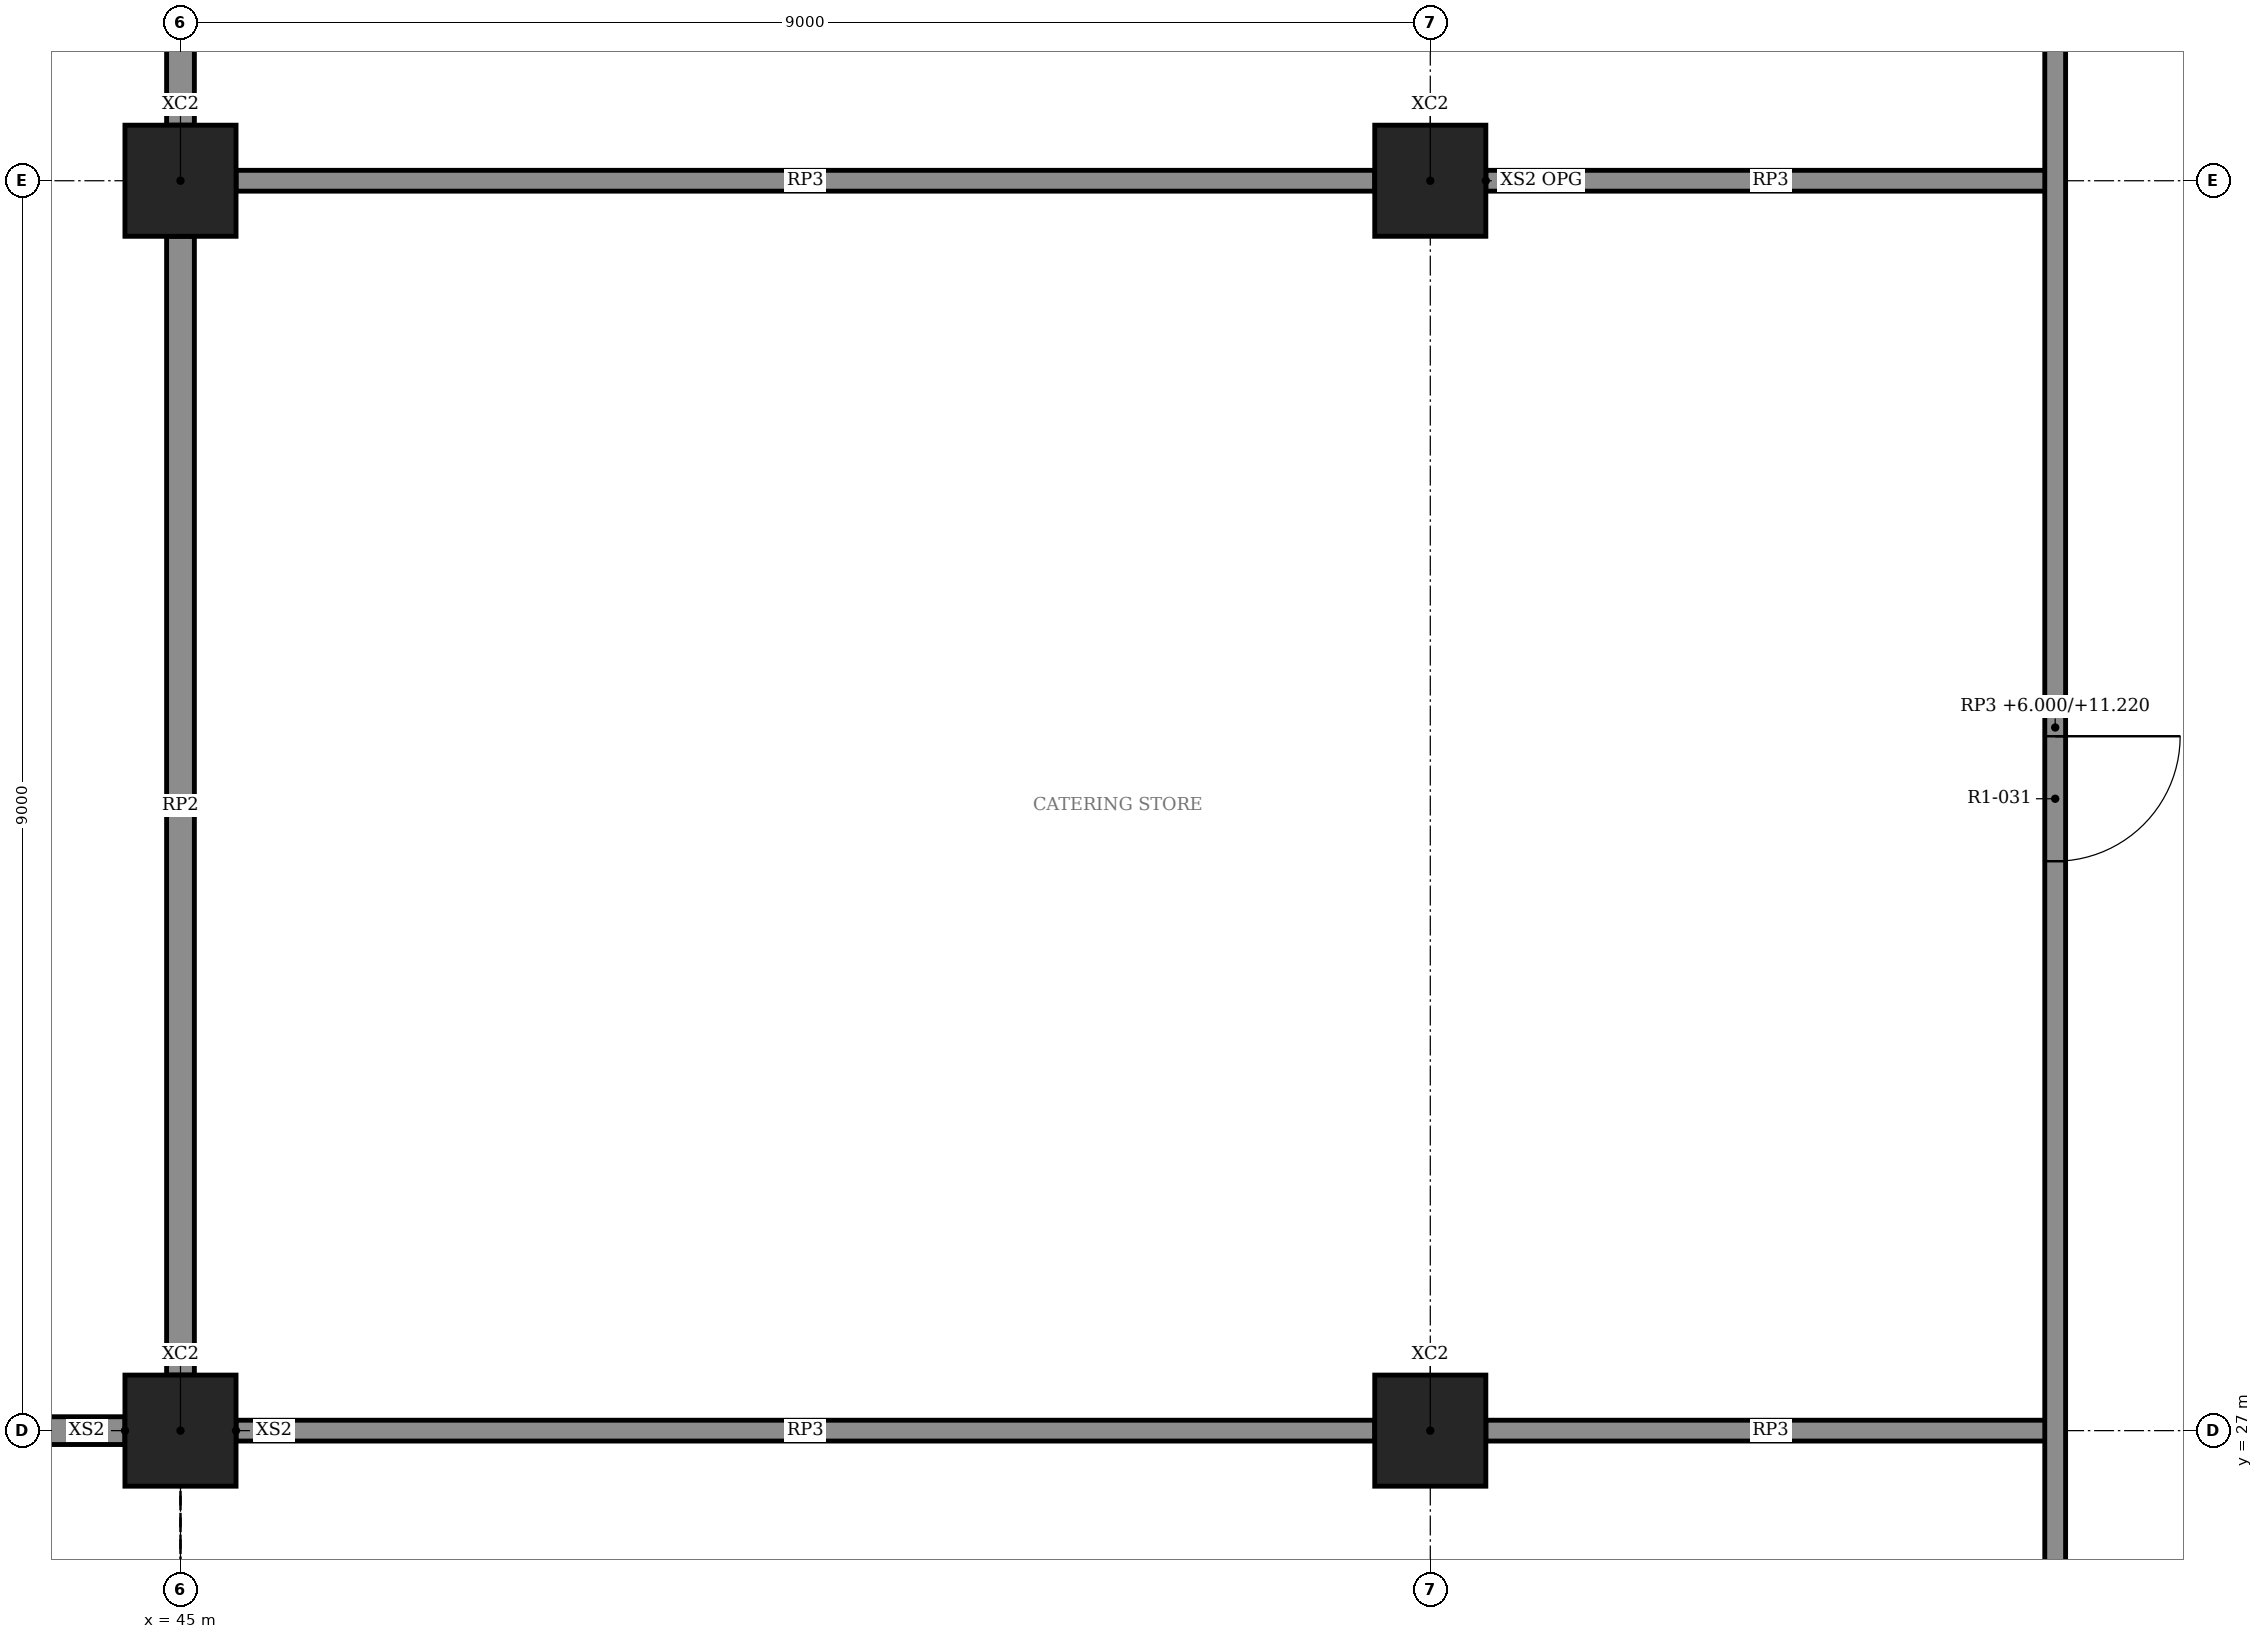
"""IFC4 building model, lengths in metres.
Left out: names, types, materials, properties, quantities, classifications, styles, units other than length and angle.
Written with IfcOpenShell. Run it as: python <this file> out.ifc"""

import sys

from ifc_helpers import new_model, si_unit, direction, frame, frame_2d, origin, origin_2d, place, context, subcontext, project, spatial, rectangle, extrude, element, fill, save


model = new_model("IFC4")
c1 = context("Model", 3, precision=1e-05, world=origin(), true_north=direction((0.0, 1.0)))
c2 = subcontext(c1, "Body", "Model", "MODEL_VIEW")
j1 = project(units=[si_unit("LENGTHUNIT", "METRE"), si_unit("PLANEANGLEUNIT", "RADIAN")], contexts=[c1])
p1 = place(None, origin())
s1 = spatial("IfcSite", under=j1, at=p1, CompositionType="ELEMENT")
p2 = place(p1, origin())
s2 = spatial("IfcBuilding", under=s1, at=p2, CompositionType="ELEMENT")
p3 = place(p2, frame((0.0, 0.0, 6.0)))
s3 = spatial("IfcBuildingStorey", under=s2, at=p3, CompositionType="ELEMENT", Elevation=6.0)
for number, where, z_axis, x_axis in (
    (1, (45.0, 27.0, 0.0), (0.0, 0.0, 1.0), (1.0, 0.0, 0.0)),
    (2, (45.0, 36.0, 0.0), (0.0, 0.0, 1.0), (1.0, 0.0, 0.0)),
    (3, (54.0, 27.0, 0.0), (0.0, 0.0, 1.0), (1.0, 0.0, 0.0)),
    (4, (54.0, 36.0, 0.0), (0.0, 0.0, 1.0), (1.0, 0.0, 0.0)),
):
    element("IfcColumn", number, at=place(p3, frame(where, z_axis=z_axis, x_axis=x_axis)), inside=s3, PredefinedType="COLUMN", context=c2, shape_type="SweptSolid", body=[
        extrude(rectangle(XDim=0.8, YDim=0.8, at=origin_2d()), origin(), (0.0, 0.0, 1.0), 5.5),
    ])
p4 = place(p3, frame((36.4, 27.0, 0.0), z_axis=(0.0, 0.0, 1.0), x_axis=(1.0, 0.0, 0.0)))
e5 = element("IfcWall", 5, at=p4, inside=s3, PredefinedType="PARTITIONING", context=c2, shape_type="SweptSolid", body=[
    extrude(rectangle(XDim=8.2, YDim=0.2, at=frame_2d((4.1, 0.0))), origin(), (0.0, 0.0, 1.0), 4.32),
])
p5 = place(p4, frame((0.95, 0.0, 0.0)))
e6 = element("IfcOpeningElement", 6, at=p5, cuts=e5, PredefinedType="OPENING", context=c2, shape_type="SweptSolid", body=[
    extrude(rectangle(XDim=1.8, YDim=2.4, at=frame_2d((0.9, 1.2))), frame((0.0, 0.11, 0.0), z_axis=(0.0, -1.0, 0.0), x_axis=(1.0, 0.0, 0.0)), (0.0, 0.0, 1.0), 0.22),
])
p6 = place(p3, frame((45.4, 27.0, 0.0), z_axis=(0.0, 0.0, 1.0), x_axis=(1.0, 0.0, 0.0)))
e7 = element("IfcWall", 7, at=p6, inside=s3, PredefinedType="PARTITIONING", context=c2, shape_type="SweptSolid", body=[
    extrude(rectangle(XDim=8.2, YDim=0.15, at=frame_2d((4.1, 0.0))), origin(), (0.0, 0.0, 1.0), 4.32),
])
p7 = place(p3, frame((54.4, 27.0, 0.0), z_axis=(0.0, 0.0, 1.0), x_axis=(1.0, 0.0, 0.0)))
e8 = element("IfcWall", 8, at=p7, inside=s3, PredefinedType="PARTITIONING", context=c2, shape_type="SweptSolid", body=[
    extrude(rectangle(XDim=4.1, YDim=0.15, at=frame_2d((2.05, 0.0))), origin(), (0.0, 0.0, 1.0), 4.32),
])
p8 = place(p3, frame((45.4, 36.0, 0.0), z_axis=(0.0, 0.0, 1.0), x_axis=(1.0, 0.0, 0.0)))
e9 = element("IfcWall", 9, at=p8, inside=s3, PredefinedType="PARTITIONING", context=c2, shape_type="SweptSolid", body=[
    extrude(rectangle(XDim=8.2, YDim=0.15, at=frame_2d((4.1, 0.0))), origin(), (0.0, 0.0, 1.0), 4.32),
])
p9 = place(p3, frame((54.4, 36.0, 0.0), z_axis=(0.0, 0.0, 1.0), x_axis=(1.0, 0.0, 0.0)))
e10 = element("IfcWall", 10, at=p9, inside=s3, PredefinedType="PARTITIONING", context=c2, shape_type="SweptSolid", body=[
    extrude(rectangle(XDim=4.1, YDim=0.15, at=frame_2d((2.05, 0.0))), origin(), (0.0, 0.0, 1.0), 4.32),
])
for number, where, z_axis, x_axis in (
    (11, (45.0, 27.4, 0.0), (0.0, 0.0, 1.0), (0.0, 1.0, 0.0)),
    (12, (45.0, 36.4, 0.0), (0.0, 0.0, 1.0), (0.0, 1.0, 0.0)),
):
    element("IfcWall", number, at=place(p3, frame(where, z_axis=z_axis, x_axis=x_axis)), inside=s3, PredefinedType="PARTITIONING", context=c2, shape_type="SweptSolid", body=[
        extrude(rectangle(XDim=8.2, YDim=0.2, at=frame_2d((4.1, 0.0))), origin(), (0.0, 0.0, 1.0), 4.32),
    ])
p10 = place(p3, frame((58.5, 9.0, 0.0), z_axis=(0.0, 0.0, 1.0), x_axis=(0.0, 1.0, 0.0)))
e13 = element("IfcWall", 13, at=p10, inside=s3, PredefinedType="PARTITIONING", context=c2, shape_type="SweptSolid", body=[
    extrude(rectangle(XDim=36.0, YDim=0.15, at=frame_2d((18.0, 0.0))), origin(), (0.0, 0.0, 1.0), 5.22),
])
p11 = place(p10, frame((8.1, 0.0, 0.0)))
e14 = element("IfcOpeningElement", 14, at=p11, cuts=e13, PredefinedType="OPENING", context=c2, shape_type="SweptSolid", body=[
    extrude(rectangle(XDim=1.8, YDim=2.4, at=frame_2d((0.9, 1.2))), frame((0.0, 0.085, 0.0), z_axis=(0.0, -1.0, 0.0), x_axis=(1.0, 0.0, 0.0)), (0.0, 0.0, 1.0), 0.17),
])
p12 = place(p10, frame((22.1, 0.0, 0.0)))
e15 = element("IfcOpeningElement", 15, at=p12, cuts=e13, PredefinedType="OPENING", context=c2, shape_type="SweptSolid", body=[
    extrude(rectangle(XDim=0.9, YDim=2.1, at=frame_2d((0.45, 1.05))), frame((0.0, 0.085, 0.0), z_axis=(0.0, -1.0, 0.0), x_axis=(1.0, 0.0, 0.0)), (0.0, 0.0, 1.0), 0.17),
])
p13 = place(p10, frame((31.1, 0.0, 0.0)))
e16 = element("IfcOpeningElement", 16, at=p13, cuts=e13, PredefinedType="OPENING", context=c2, shape_type="SweptSolid", body=[
    extrude(rectangle(XDim=1.0, YDim=2.4, at=frame_2d((0.5, 1.2))), frame((0.0, 0.085, 0.0), z_axis=(0.0, -1.0, 0.0), x_axis=(1.0, 0.0, 0.0)), (0.0, 0.0, 1.0), 0.17),
])
p14 = place(p12, frame((0.9, 0.0, 0.0), z_axis=(0.0, 0.0, 1.0), x_axis=(-1.0, 0.0, 0.0)))
e17 = element("IfcDoor", 17, at=p14, inside=s3, OperationType="SINGLE_SWING_LEFT", PredefinedType="DOOR", context=c2, shape_type="SweptSolid", body=[
    extrude(rectangle(XDim=0.9, YDim=2.1, at=frame_2d((0.45, 1.05))), frame((0.0, 0.025, 0.0), z_axis=(0.0, -1.0, 0.0), x_axis=(1.0, 0.0, 0.0)), (0.0, 0.0, 1.0), 0.05),
])
fill(e15, e17)
save(model, sys.argv[1])
